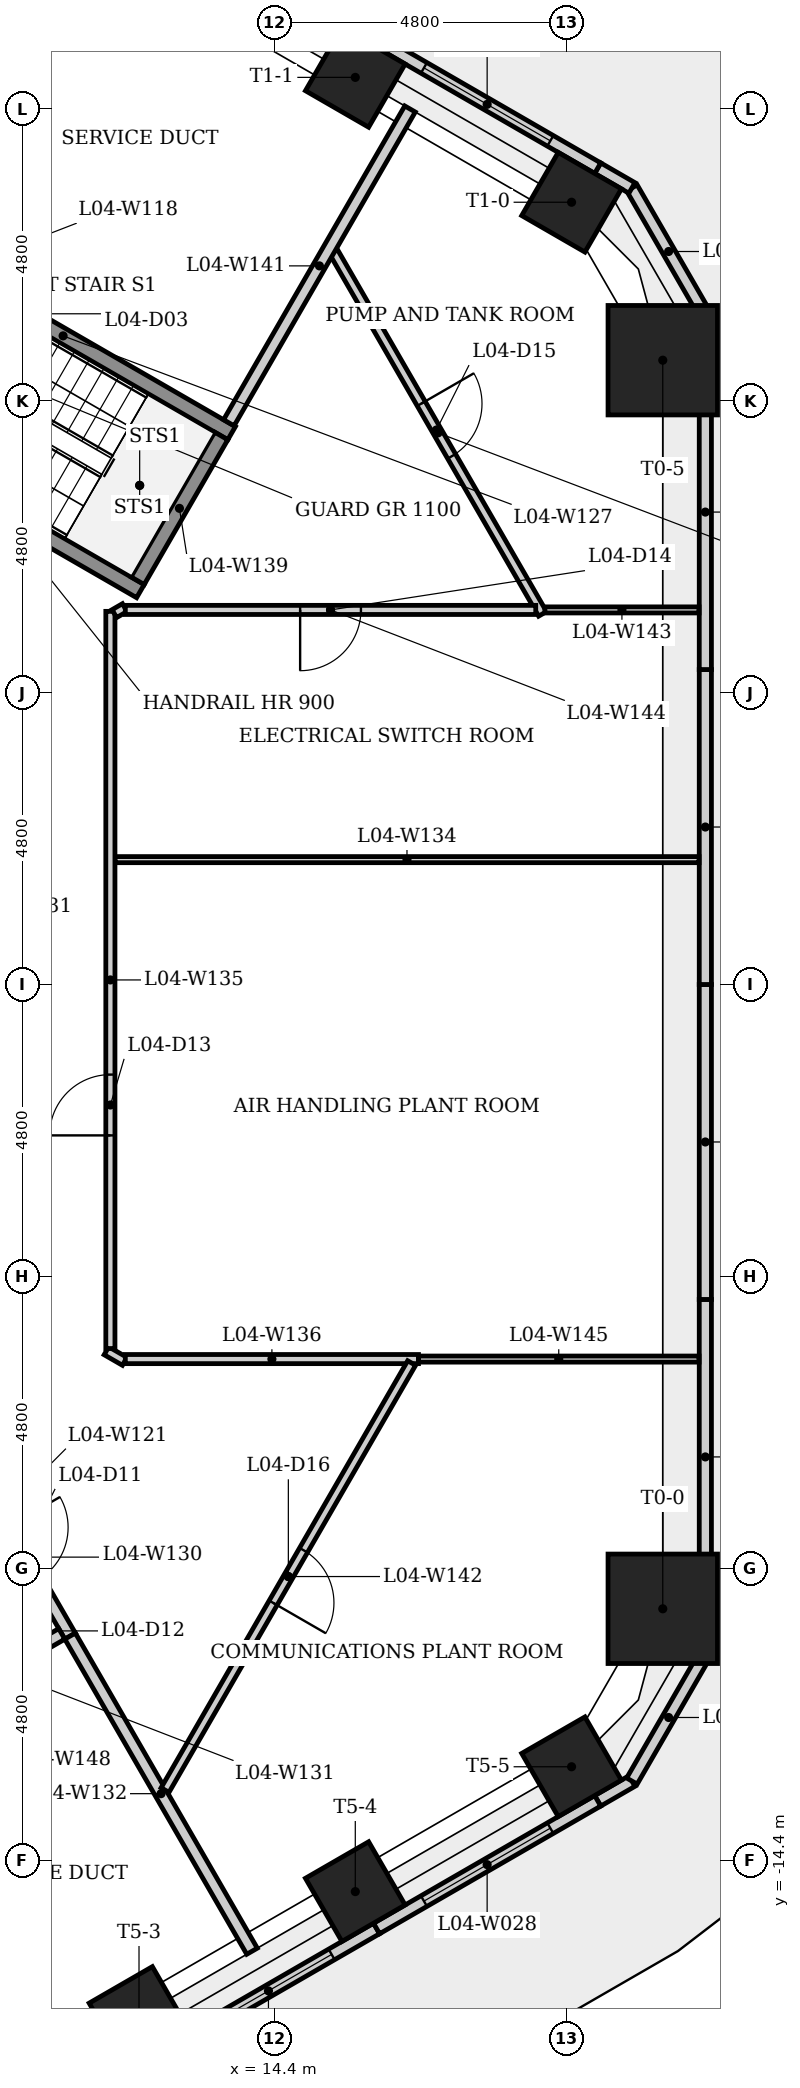
"""IFC4 building model, lengths in metres.
Left out: names, types, materials, properties, quantities, classifications, styles, units other than length and angle.
Written with IfcOpenShell. Run it as: python <this file> out.ifc"""

import sys

from ifc_helpers import new_model, si_unit, direction, frame, frame_2d, origin, origin_2d, place, context, subcontext, project, spatial, rectangle, extrude, element, fill, save


model = new_model("IFC4")
c1 = context("Model", 3, precision=1e-05, world=origin(), true_north=direction((0.0, 1.0)))
c2 = subcontext(c1, "Body", "Model", "MODEL_VIEW")
j1 = project(units=[si_unit("LENGTHUNIT", "METRE"), si_unit("PLANEANGLEUNIT", "RADIAN")], contexts=[c1])
p1 = place(None, origin())
s1 = spatial("IfcSite", under=j1, at=p1, CompositionType="ELEMENT")
p2 = place(p1, origin())
s2 = spatial("IfcBuilding", under=s1, at=p2, CompositionType="ELEMENT")
p3 = place(p2, frame((0.0, 0.0, 20.5)))
s3 = spatial("IfcBuildingStorey", under=s2, at=p3, CompositionType="ELEMENT", Elevation=20.5)
for number, where, z_axis, x_axis in (
    (1, (20.785, -10.268, 0.0), (0.0, 0.0, 1.0), (1.0, 0.0, 0.0)),
    (2, (20.785, 10.268, 0.0), (0.0, 0.0, 1.0), (1.0, 0.0, 0.0)),
):
    element("IfcColumn", number, at=place(p3, frame(where, z_axis=z_axis, x_axis=x_axis)), inside=s3, PredefinedType="COLUMN", context=c2, shape_type="SweptSolid", body=[
        extrude(rectangle(XDim=1.8, YDim=1.8, at=origin_2d()), origin(), (0.0, 0.0, 1.0), 5.0),
    ])
for number, where, z_axis, x_axis in (
    (3, (19.285, 12.866, 0.0), (0.0, 0.0, 1.0), (0.5, 0.866, 0.0)),
    (4, (15.728, 14.92, 0.0), (0.0, 0.0, 1.0), (0.5, 0.866, 0.0)),
    (5, (12.171, -16.973, 0.0), (0.0, 0.0, 1.0), (0.5, -0.866, 0.0)),
    (6, (15.728, -14.92, 0.0), (0.0, 0.0, 1.0), (0.5, -0.866, 0.0)),
    (7, (19.285, -12.866, 0.0), (0.0, 0.0, 1.0), (0.5, -0.866, 0.0)),
):
    element("IfcColumn", number, at=place(p3, frame(where, z_axis=z_axis, x_axis=x_axis)), inside=s3, PredefinedType="COLUMN", context=c2, shape_type="SweptSolid", body=[
        extrude(rectangle(XDim=1.2, YDim=1.2, at=origin_2d()), origin(), (0.0, 0.0, 1.0), 5.0),
    ])
p4 = place(p3, frame((12.521, -17.579, 0.0), z_axis=(0.0, 0.0, 1.0), x_axis=(0.866036113234, 0.499981450231, 0.0)))
e8 = element("IfcWall", 8, at=p4, inside=s3, PredefinedType="SOLIDWALL", context=c2, shape_type="SweptSolid", body=[
    extrude(rectangle(XDim=4.107, YDim=0.2, at=frame_2d((2.054, 0.0))), origin(), (0.0, 0.0, 1.0), 4.88),
])
p5 = place(p4, frame((0.854, 0.0, 0.8)))
e9 = element("IfcOpeningElement", 9, at=p5, cuts=e8, PredefinedType="OPENING", context=c2, shape_type="SweptSolid", body=[
    extrude(rectangle(XDim=2.4, YDim=2.4, at=frame_2d((1.2, 1.2))), frame((0.0, 0.11, 0.0), z_axis=(0.0, -1.0, 0.0), x_axis=(1.0, 0.0, 0.0)), (0.0, 0.0, 1.0), 0.22),
])
p6 = place(p3, frame((16.078, -15.526, 0.0), z_axis=(0.0, 0.0, 1.0), x_axis=(0.866016145416, 0.500016035621, 0.0)))
e10 = element("IfcWall", 10, at=p6, inside=s3, PredefinedType="SOLIDWALL", context=c2, shape_type="SweptSolid", body=[
    extrude(rectangle(XDim=4.199, YDim=0.2, at=frame_2d((2.1, 0.0))), origin(), (0.0, 0.0, 1.0), 4.88),
])
p7 = place(p6, frame((0.9, 0.0, 0.8)))
e11 = element("IfcOpeningElement", 11, at=p7, cuts=e10, PredefinedType="OPENING", context=c2, shape_type="SweptSolid", body=[
    extrude(rectangle(XDim=2.4, YDim=2.4, at=frame_2d((1.2, 1.2))), frame((0.0, 0.11, 0.0), z_axis=(0.0, -1.0, 0.0), x_axis=(1.0, 0.0, 0.0)), (0.0, 0.0, 1.0), 0.22),
])
p8 = place(p3, frame((19.714, -13.426, 0.0), z_axis=(0.0, 0.0, 1.0), x_axis=(0.865922902183, 0.50017749597, 0.0)))
e12 = element("IfcWall", 12, at=p8, inside=s3, PredefinedType="SOLIDWALL", context=c2, shape_type="SweptSolid", body=[
    extrude(rectangle(XDim=0.65, YDim=0.2, at=frame_2d((0.325, 0.0))), origin(), (0.0, 0.0, 1.0), 4.88),
])
p9 = place(p3, frame((20.277, -13.101, 0.0), z_axis=(0.0, 0.0, 1.0), x_axis=(0.499999616612, 0.866025625133, 0.0)))
e13 = element("IfcWall", 13, at=p9, inside=s3, PredefinedType="SOLIDWALL", context=c2, shape_type="SweptSolid", body=[
    extrude(rectangle(XDim=2.415, YDim=0.2, at=frame_2d((1.207, 0.0))), origin(), (0.0, 0.0, 1.0), 4.88),
])
p10 = place(p3, frame((21.485, -11.01, 0.0), z_axis=(0.0, 0.0, 1.0), x_axis=(0.0, 1.0, 0.0)))
e14 = element("IfcWall", 14, at=p10, inside=s3, PredefinedType="SOLIDWALL", context=c2, shape_type="SweptSolid", body=[
    extrude(rectangle(XDim=0.65, YDim=0.2, at=frame_2d((0.325, 0.0))), origin(), (0.0, 0.0, 1.0), 4.88),
])
p11 = place(p3, frame((21.485, -10.36, 0.0), z_axis=(0.0, 0.0, 1.0), x_axis=(0.0, 1.0, 0.0)))
e15 = element("IfcWall", 15, at=p11, inside=s3, PredefinedType="SOLIDWALL", context=c2, shape_type="SweptSolid", body=[
    extrude(rectangle(XDim=5.18, YDim=0.2, at=frame_2d((2.59, 0.0))), origin(), (0.0, 0.0, 1.0), 4.88),
])
for number, where, z_axis, x_axis in (
    (16, (21.485, -5.18, 0.0), (0.0, 0.0, 1.0), (0.0, 1.0, 0.0)),
    (17, (21.485, 0.0, 0.0), (0.0, 0.0, 1.0), (0.0, 1.0, 0.0)),
):
    element("IfcWall", number, at=place(p3, frame(where, z_axis=z_axis, x_axis=x_axis)), inside=s3, PredefinedType="SOLIDWALL", context=c2, shape_type="SweptSolid", body=[
        extrude(rectangle(XDim=5.18, YDim=0.2, at=frame_2d((2.59, 0.0))), origin(), (0.0, 0.0, 1.0), 4.88),
    ])
p12 = place(p3, frame((21.485, 5.18, 0.0), z_axis=(0.0, 0.0, 1.0), x_axis=(0.0, 1.0, 0.0)))
e18 = element("IfcWall", 18, at=p12, inside=s3, PredefinedType="SOLIDWALL", context=c2, shape_type="SweptSolid", body=[
    extrude(rectangle(XDim=5.18, YDim=0.2, at=frame_2d((2.59, 0.0))), origin(), (0.0, 0.0, 1.0), 4.88),
])
p13 = place(p3, frame((21.485, 10.36, 0.0), z_axis=(0.0, 0.0, 1.0), x_axis=(0.0, 1.0, 0.0)))
e19 = element("IfcWall", 19, at=p13, inside=s3, PredefinedType="SOLIDWALL", context=c2, shape_type="SweptSolid", body=[
    extrude(rectangle(XDim=0.65, YDim=0.2, at=frame_2d((0.325, 0.0))), origin(), (0.0, 0.0, 1.0), 4.88),
])
p14 = place(p3, frame((21.485, 11.01, 0.0), z_axis=(0.0, 0.0, 1.0), x_axis=(-0.499999616612, 0.866025625133, 0.0)))
e20 = element("IfcWall", 20, at=p14, inside=s3, PredefinedType="SOLIDWALL", context=c2, shape_type="SweptSolid", body=[
    extrude(rectangle(XDim=2.415, YDim=0.2, at=frame_2d((1.207, 0.0))), origin(), (0.0, 0.0, 1.0), 4.88),
])
p15 = place(p3, frame((20.277, 13.101, 0.0), z_axis=(0.0, 0.0, 1.0), x_axis=(-0.865922902183, 0.50017749597, 0.0)))
e21 = element("IfcWall", 21, at=p15, inside=s3, PredefinedType="SOLIDWALL", context=c2, shape_type="SweptSolid", body=[
    extrude(rectangle(XDim=0.65, YDim=0.2, at=frame_2d((0.325, 0.0))), origin(), (0.0, 0.0, 1.0), 4.88),
])
p16 = place(p3, frame((19.714, 13.426, 0.0), z_axis=(0.0, 0.0, 1.0), x_axis=(-0.866041321553, 0.499972428603, 0.0)))
e22 = element("IfcWall", 22, at=p16, inside=s3, PredefinedType="SOLIDWALL", context=c2, shape_type="SweptSolid", body=[
    extrude(rectangle(XDim=4.199, YDim=0.2, at=frame_2d((2.1, 0.0))), origin(), (0.0, 0.0, 1.0), 4.88),
])
p17 = place(p16, frame((0.899, 0.0, 0.8)))
e23 = element("IfcOpeningElement", 23, at=p17, cuts=e22, PredefinedType="OPENING", context=c2, shape_type="SweptSolid", body=[
    extrude(rectangle(XDim=2.4, YDim=2.4, at=frame_2d((1.2, 1.2))), frame((0.0, 0.11, 0.0), z_axis=(0.0, -1.0, 0.0), x_axis=(1.0, 0.0, 0.0)), (0.0, 0.0, 1.0), 0.22),
])
p18 = place(p3, frame((8.151, 12.268, 0.0), z_axis=(0.0, 0.0, 1.0), x_axis=(0.866025499775, -0.499999833739, 0.0)))
e24 = element("IfcWall", 24, at=p18, inside=s3, PredefinedType="SHEAR", context=c2, shape_type="SweptSolid", body=[
    extrude(rectangle(XDim=6.4, YDim=0.25, at=frame_2d((3.2, 0.0))), origin(), (0.0, 0.0, 1.0), 4.65),
])
p19 = place(p3, frame((9.537, -8.119, 0.0), z_axis=(0.0, 0.0, 1.0), x_axis=(0.499990139034, -0.866031096941, 0.0)))
e25 = element("IfcWall", 25, at=p19, inside=s3, PredefinedType="PARTITIONING", context=c2, shape_type="SweptSolid", body=[
    extrude(rectangle(XDim=3.0, YDim=0.2, at=frame_2d((1.5, 0.0))), origin(), (0.0, 0.0, 1.0), 4.65),
])
p20 = place(p19, frame((0.935, 0.0, 0.0)))
e26 = element("IfcOpeningElement", 26, at=p20, cuts=e25, PredefinedType="OPENING", context=c2, shape_type="SweptSolid", body=[
    extrude(rectangle(XDim=1.0, YDim=2.1, at=frame_2d((0.5, 1.05))), frame((0.0, 0.11, 0.0), z_axis=(0.0, -1.0, 0.0), x_axis=(1.0, 0.0, 0.0)), (0.0, 0.0, 1.0), 0.22),
])
p21 = place(p3, frame((10.901, -10.681, 0.0), z_axis=(0.0, 0.0, 1.0), x_axis=(-0.866007538022, -0.500030943131, 0.0)))
e27 = element("IfcWall", 27, at=p21, inside=s3, PredefinedType="PLUMBINGWALL", context=c2, shape_type="SweptSolid", body=[
    extrude(rectangle(XDim=2.375, YDim=0.2, at=frame_2d((1.188, 0.0))), origin(), (0.0, 0.0, 1.0), 4.65),
])
p22 = place(p3, frame((11.037, -10.717, 0.0), z_axis=(0.0, 0.0, 1.0), x_axis=(0.500000259638, -0.866025253883, 0.0)))
e28 = element("IfcWall", 28, at=p22, inside=s3, PredefinedType="PLUMBINGWALL", context=c2, shape_type="SweptSolid", body=[
    extrude(rectangle(XDim=5.984, YDim=0.2, at=frame_2d((2.992, 0.0))), origin(), (0.0, 0.0, 1.0), 4.65),
])
p23 = place(p3, frame((11.635, -6.025, 0.0), z_axis=(0.0, 0.0, 1.0), x_axis=(0.866115353951, -0.499844169366, 0.0)))
e29 = element("IfcWall", 29, at=p23, inside=s3, PredefinedType="PARTITIONING", context=c2, shape_type="SweptSolid", body=[
    extrude(rectangle(XDim=0.347, YDim=0.15, at=frame_2d((0.174, 0.0))), origin(), (0.0, 0.0, 1.0), 4.65),
])
p24 = place(p3, frame((11.775, 2.054, 0.0), z_axis=(0.0, 0.0, 1.0), x_axis=(1.0, 0.0, 0.0)))
e30 = element("IfcWall", 30, at=p24, inside=s3, PredefinedType="PARTITIONING", context=c2, shape_type="SweptSolid", body=[
    extrude(rectangle(XDim=9.606, YDim=0.1, at=frame_2d((4.803, 0.0))), origin(), (0.0, 0.0, 1.0), 4.65),
])
p25 = place(p3, frame((11.7, -5.987, 0.0), z_axis=(0.0, 0.0, 1.0), x_axis=(0.0, 1.0, 0.0)))
e31 = element("IfcWall", 31, at=p25, inside=s3, PredefinedType="PARTITIONING", context=c2, shape_type="SweptSolid", body=[
    extrude(rectangle(XDim=12.125, YDim=0.15, at=frame_2d((6.062, 0.0))), origin(), (0.0, 0.0, 1.0), 4.65),
])
p26 = place(p25, frame((3.505, 0.0, 0.0)))
e32 = element("IfcOpeningElement", 32, at=p26, cuts=e31, PredefinedType="OPENING", context=c2, shape_type="SweptSolid", body=[
    extrude(rectangle(XDim=1.0, YDim=2.1, at=frame_2d((0.5, 1.05))), frame((0.0, 0.085, 0.0), z_axis=(0.0, -1.0, 0.0), x_axis=(1.0, 0.0, 0.0)), (0.0, 0.0, 1.0), 0.17),
])
p27 = place(p3, frame((11.946, -6.161, 0.0), z_axis=(0.0, 0.0, 1.0), x_axis=(1.0, 0.0, 0.0)))
e33 = element("IfcWall", 33, at=p27, inside=s3, PredefinedType="PARTITIONING", context=c2, shape_type="SweptSolid", body=[
    extrude(rectangle(XDim=4.821, YDim=0.15, at=frame_2d((2.411, 0.0))), origin(), (0.0, 0.0, 1.0), 4.65),
])
p28 = place(p3, frame((11.936, 6.198, 0.0), z_axis=(0.0, 0.0, 1.0), x_axis=(-0.866103179807, -0.499865263774, 0.0)))
e34 = element("IfcWall", 34, at=p28, inside=s3, PredefinedType="PARTITIONING", context=c2, shape_type="SweptSolid", body=[
    extrude(rectangle(XDim=0.197, YDim=0.15, at=frame_2d((0.099, 0.0))), origin(), (0.0, 0.0, 1.0), 4.65),
])
p29 = place(p3, frame((12.194, 6.47, 0.0), z_axis=(0.0, 0.0, 1.0), x_axis=(-0.866025499775, 0.499999833739, 0.0)))
e35 = element("IfcWall", 35, at=p29, inside=s3, PredefinedType="SHEAR", context=c2, shape_type="SweptSolid", body=[
    extrude(rectangle(XDim=6.4, YDim=0.25, at=frame_2d((3.2, 0.0))), origin(), (0.0, 0.0, 1.0), 4.65),
])
p30 = place(p29, frame((5.25, 0.0, 0.0)))
e36 = element("IfcOpeningElement", 36, at=p30, cuts=e35, PredefinedType="OPENING", context=c2, shape_type="SweptSolid", body=[
    extrude(rectangle(XDim=1.0, YDim=2.1, at=frame_2d((0.5, 1.05))), frame((0.0, 0.135, 0.0), z_axis=(0.0, -1.0, 0.0), x_axis=(1.0, 0.0, 0.0)), (0.0, 0.0, 1.0), 0.27),
])
p31 = place(p3, frame((13.523, 9.022, 0.0), z_axis=(0.0, 0.0, 1.0), x_axis=(-0.500034990121, -0.866005201286, 0.0)))
e37 = element("IfcWall", 37, at=p31, inside=s3, PredefinedType="SHEAR", context=c2, shape_type="SweptSolid", body=[
    extrude(rectangle(XDim=2.75, YDim=0.25, at=frame_2d((1.375, 0.0))), origin(), (0.0, 0.0, 1.0), 4.65),
])
p32 = place(p3, frame((15.371, 12.049, 0.0), z_axis=(0.0, 0.0, 1.0), x_axis=(0.49999297727, -0.866029458321, 0.0)))
e38 = element("IfcWall", 38, at=p32, inside=s3, PredefinedType="PARTITIONING", context=c2, shape_type="SweptSolid", body=[
    extrude(rectangle(XDim=6.875, YDim=0.15, at=frame_2d((3.437, 0.0))), origin(), (0.0, 0.0, 1.0), 4.65),
])
p33 = place(p32, frame((2.882, 0.0, 0.0)))
e39 = element("IfcOpeningElement", 39, at=p33, cuts=e38, PredefinedType="OPENING", context=c2, shape_type="SweptSolid", body=[
    extrude(rectangle(XDim=1.0, YDim=2.1, at=frame_2d((0.5, 1.05))), frame((0.0, 0.085, 0.0), z_axis=(0.0, -1.0, 0.0), x_axis=(1.0, 0.0, 0.0)), (0.0, 0.0, 1.0), 0.17),
])
p34 = place(p3, frame((13.648, 9.239, 0.0), z_axis=(0.0, 0.0, 1.0), x_axis=(0.499994325412, 0.866028679985, 0.0)))
e40 = element("IfcWall", 40, at=p34, inside=s3, PredefinedType="PLUMBINGWALL", context=c2, shape_type="SweptSolid", body=[
    extrude(rectangle(XDim=5.959, YDim=0.2, at=frame_2d((2.98, 0.0))), origin(), (0.0, 0.0, 1.0), 4.65),
])
p35 = place(p3, frame((16.654, -6.226, 0.0), z_axis=(0.0, 0.0, 1.0), x_axis=(-0.500004743543, -0.866022665081, 0.0)))
e41 = element("IfcWall", 41, at=p35, inside=s3, PredefinedType="PARTITIONING", context=c2, shape_type="SweptSolid", body=[
    extrude(rectangle(XDim=8.11, YDim=0.15, at=frame_2d((4.055, 0.0))), origin(), (0.0, 0.0, 1.0), 4.65),
])
p36 = place(p35, frame((3.555, 0.0, 0.0)))
e42 = element("IfcOpeningElement", 42, at=p36, cuts=e41, PredefinedType="OPENING", context=c2, shape_type="SweptSolid", body=[
    extrude(rectangle(XDim=1.0, YDim=2.1, at=frame_2d((0.5, 1.05))), frame((0.0, 0.085, 0.0), z_axis=(0.0, -1.0, 0.0), x_axis=(1.0, 0.0, 0.0)), (0.0, 0.0, 1.0), 0.17),
])
p37 = place(p3, frame((18.845, 6.161, 0.0), z_axis=(0.0, 0.0, 1.0), x_axis=(1.0, 0.0, 0.0)))
e43 = element("IfcWall", 43, at=p37, inside=s3, PredefinedType="PARTITIONING", context=c2, shape_type="SweptSolid", body=[
    extrude(rectangle(XDim=2.535, YDim=0.1, at=frame_2d((1.268, 0.0))), origin(), (0.0, 0.0, 1.0), 4.65),
])
p38 = place(p3, frame((18.695, 6.161, 0.0), z_axis=(0.0, 0.0, 1.0), x_axis=(-1.0, 0.0, 0.0)))
e44 = element("IfcWall", 44, at=p38, inside=s3, PredefinedType="PARTITIONING", context=c2, shape_type="SweptSolid", body=[
    extrude(rectangle(XDim=6.75, YDim=0.15, at=frame_2d((3.375, 0.0))), origin(), (0.0, 0.0, 1.0), 4.65),
])
p39 = place(p38, frame((2.875, 0.0, 0.0)))
e45 = element("IfcOpeningElement", 45, at=p39, cuts=e44, PredefinedType="OPENING", context=c2, shape_type="SweptSolid", body=[
    extrude(rectangle(XDim=1.0, YDim=2.1, at=frame_2d((0.5, 1.05))), frame((0.0, 0.085, 0.0), z_axis=(0.0, -1.0, 0.0), x_axis=(1.0, 0.0, 0.0)), (0.0, 0.0, 1.0), 0.17),
])
p40 = place(p3, frame((21.381, -6.161, 0.0), z_axis=(0.0, 0.0, 1.0), x_axis=(-1.0, 0.0, 0.0)))
e46 = element("IfcWall", 46, at=p40, inside=s3, PredefinedType="PARTITIONING", context=c2, shape_type="SweptSolid", body=[
    extrude(rectangle(XDim=4.614, YDim=0.1, at=frame_2d((2.307, 0.0))), origin(), (0.0, 0.0, 1.0), 4.65),
])
p41 = place(p5, origin())
e47 = element("IfcWindow", 47, at=p41, inside=s3, PartitioningType="SINGLE_PANEL", PredefinedType="WINDOW", context=c2, shape_type="SweptSolid", body=[
    extrude(rectangle(XDim=2.4, YDim=2.4, at=frame_2d((1.2, 1.2))), frame((0.0, 0.03, 0.0), z_axis=(0.0, -1.0, 0.0), x_axis=(1.0, 0.0, 0.0)), (0.0, 0.0, 1.0), 0.06),
])
fill(e9, e47)
p42 = place(p7, origin())
e48 = element("IfcWindow", 48, at=p42, inside=s3, PartitioningType="SINGLE_PANEL", PredefinedType="WINDOW", context=c2, shape_type="SweptSolid", body=[
    extrude(rectangle(XDim=2.4, YDim=2.4, at=frame_2d((1.2, 1.2))), frame((0.0, 0.03, 0.0), z_axis=(0.0, -1.0, 0.0), x_axis=(1.0, 0.0, 0.0)), (0.0, 0.0, 1.0), 0.06),
])
fill(e11, e48)
p43 = place(p17, origin())
e49 = element("IfcWindow", 49, at=p43, inside=s3, PartitioningType="SINGLE_PANEL", PredefinedType="WINDOW", context=c2, shape_type="SweptSolid", body=[
    extrude(rectangle(XDim=2.4, YDim=2.4, at=frame_2d((1.2, 1.2))), frame((0.0, 0.03, 0.0), z_axis=(0.0, -1.0, 0.0), x_axis=(1.0, 0.0, 0.0)), (0.0, 0.0, 1.0), 0.06),
])
fill(e23, e49)
p44 = place(p26, origin())
e50 = element("IfcDoor", 50, at=p44, inside=s3, OperationType="SINGLE_SWING_LEFT", PredefinedType="DOOR", context=c2, shape_type="SweptSolid", body=[
    extrude(rectangle(XDim=1.0, YDim=2.1, at=frame_2d((0.5, 1.05))), frame((0.0, 0.025, 0.0), z_axis=(0.0, -1.0, 0.0), x_axis=(1.0, 0.0, 0.0)), (0.0, 0.0, 1.0), 0.05),
])
fill(e32, e50)
p45 = place(p39, origin())
e51 = element("IfcDoor", 51, at=p45, inside=s3, OperationType="SINGLE_SWING_RIGHT", PredefinedType="DOOR", context=c2, shape_type="SweptSolid", body=[
    extrude(rectangle(XDim=1.0, YDim=2.1, at=frame_2d((0.5, 1.05))), frame((0.0, 0.025, 0.0), z_axis=(0.0, -1.0, 0.0), x_axis=(1.0, 0.0, 0.0)), (0.0, 0.0, 1.0), 0.05),
])
fill(e45, e51)
p46 = place(p33, origin())
e52 = element("IfcDoor", 52, at=p46, inside=s3, OperationType="SINGLE_SWING_LEFT", PredefinedType="DOOR", context=c2, shape_type="SweptSolid", body=[
    extrude(rectangle(XDim=1.0, YDim=2.1, at=frame_2d((0.5, 1.05))), frame((0.0, 0.025, 0.0), z_axis=(0.0, -1.0, 0.0), x_axis=(1.0, 0.0, 0.0)), (0.0, 0.0, 1.0), 0.05),
])
fill(e39, e52)
p47 = place(p36, origin())
e53 = element("IfcDoor", 53, at=p47, inside=s3, OperationType="SINGLE_SWING_RIGHT", PredefinedType="DOOR", context=c2, shape_type="SweptSolid", body=[
    extrude(rectangle(XDim=1.0, YDim=2.1, at=frame_2d((0.5, 1.05))), frame((0.0, 0.025, 0.0), z_axis=(0.0, -1.0, 0.0), x_axis=(1.0, 0.0, 0.0)), (0.0, 0.0, 1.0), 0.05),
])
fill(e42, e53)
save(model, sys.argv[1])
